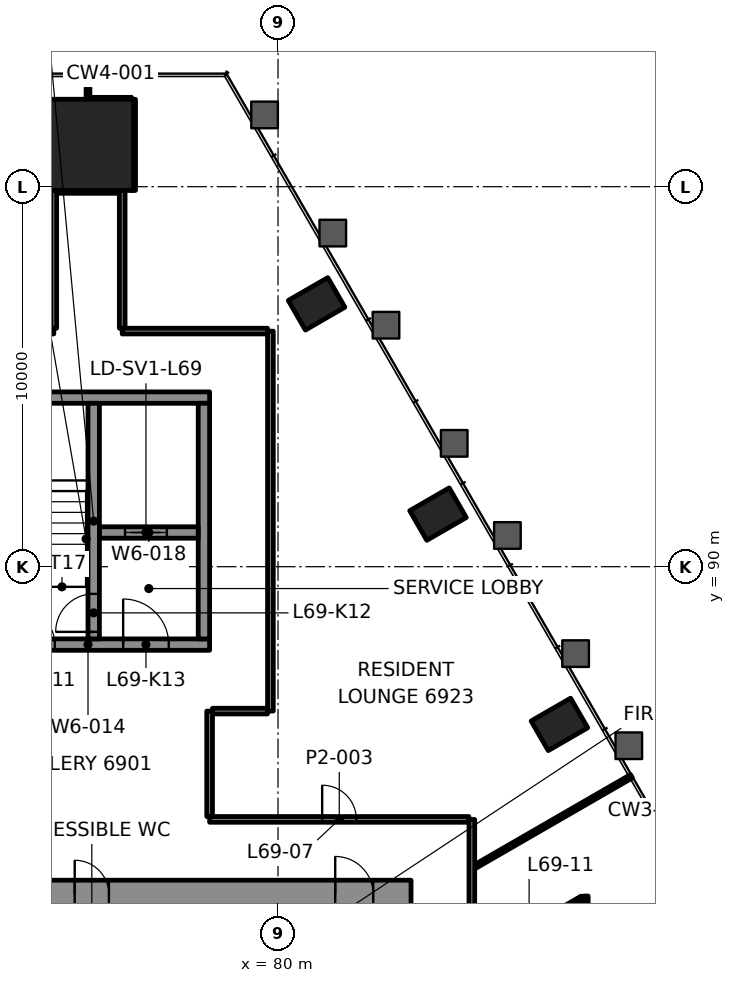
"""IFC4 building model, lengths in metres.
Left out: names, types, materials, properties, quantities, classifications, styles, units other than length and angle.
Written with IfcOpenShell. Run it as: python <this file> out.ifc"""

import sys

from ifc_helpers import new_model, si_unit, direction, frame, frame_2d, origin, origin_2d, place, context, subcontext, project, spatial, rectangle, hollow_rectangle, extrude, element, fill, save


model = new_model("IFC4")
c1 = context("Model", 3, precision=1e-05, world=origin(), true_north=direction((0.0, 1.0)))
c2 = subcontext(c1, "Body", "Model", "MODEL_VIEW")
j1 = project(units=[si_unit("LENGTHUNIT", "METRE"), si_unit("PLANEANGLEUNIT", "RADIAN")], contexts=[c1])
p1 = place(None, origin())
s1 = spatial("IfcSite", under=j1, at=p1, CompositionType="ELEMENT")
p2 = place(p1, origin())
s2 = spatial("IfcBuilding", under=s1, at=p2, CompositionType="ELEMENT")
p3 = place(p2, frame((0.0, 0.0, 288.1)))
s3 = spatial("IfcBuildingStorey", under=s2, at=p3, CompositionType="ELEMENT", Elevation=288.1)
p4 = place(p3, frame((75.0, 101.101, 0.0), z_axis=(0.0, 0.0, 1.0), x_axis=(-1.0, 0.0, 0.0)))
e1 = element("IfcColumn", 1, at=p4, inside=s3, PredefinedType="COLUMN", context=c2, shape_type="SweptSolid", body=[
    extrude(rectangle(XDim=2.4, YDim=2.4, at=origin_2d()), origin(), (0.0, 0.0, 1.0), 3.5),
])
for number, where, z_axis, x_axis in (
    (2, (87.405, 85.851, -0.0), (0.0, 0.0, 1.0), (-0.5, 0.866, 0.0)),
    (3, (84.21, 91.384, -0.0), (0.0, 0.0, 1.0), (-0.5, 0.866, 0.0)),
    (4, (81.015, 96.917, -0.0), (0.0, 0.0, 1.0), (-0.5, 0.866, 0.0)),
):
    element("IfcColumn", number, at=place(p3, frame(where, z_axis=z_axis, x_axis=x_axis)), inside=s3, PredefinedType="COLUMN", context=c2, shape_type="SweptSolid", body=[
        extrude(hollow_rectangle(XDim=0.9, YDim=1.2, WallThickness=0.06, at=origin_2d()), origin(), (0.0, 0.0, 1.0), 3.5),
    ])
p5 = place(p3, frame((66.5, 81.375, 0.0), z_axis=(0.0, 0.0, 1.0), x_axis=(1.0, 0.0, 0.0)))
e5 = element("IfcWall", 5, at=p5, inside=s3, PredefinedType="SHEAR", context=c2, shape_type="SweptSolid", body=[
    extrude(rectangle(XDim=17.0, YDim=0.75, at=frame_2d((8.5, 0.0))), origin(), (0.0, 0.0, 1.0), 3.3),
])
p6 = place(p5, frame((1.195, 0.0, 0.0)))
e6 = element("IfcOpeningElement", 6, at=p6, cuts=e5, PredefinedType="OPENING", context=c2, shape_type="SweptSolid", body=[
    extrude(rectangle(XDim=1.0, YDim=2.1, at=frame_2d((0.5, 1.05))), frame((0.0, 0.385, 0.0), z_axis=(0.0, -1.0, 0.0), x_axis=(1.0, 0.0, 0.0)), (0.0, 0.0, 1.0), 0.77),
])
p7 = place(p5, frame((15.005, 0.0, 0.0)))
e7 = element("IfcOpeningElement", 7, at=p7, cuts=e5, PredefinedType="OPENING", context=c2, shape_type="SweptSolid", body=[
    extrude(rectangle(XDim=1.0, YDim=2.1, at=frame_2d((0.5, 1.05))), frame((0.0, 0.385, 0.0), z_axis=(0.0, -1.0, 0.0), x_axis=(1.0, 0.0, 0.0)), (0.0, 0.0, 1.0), 0.77),
])
p8 = place(p5, frame((8.15, 0.0, 0.0)))
e8 = element("IfcOpeningElement", 8, at=p8, cuts=e5, PredefinedType="OPENING", context=c2, shape_type="SweptSolid", body=[
    extrude(rectangle(XDim=0.9, YDim=2.1, at=frame_2d((0.45, 1.05))), frame((0.0, 0.385, 0.0), z_axis=(0.0, -1.0, 0.0), x_axis=(1.0, 0.0, 0.0)), (0.0, 0.0, 1.0), 0.77),
])
p9 = place(p3, frame((71.8, 87.95, 0.0), z_axis=(0.0, 0.0, 1.0), x_axis=(1.0, 0.0, 0.0)))
e9 = element("IfcWall", 9, at=p9, inside=s3, PredefinedType="SHEAR", context=c2, shape_type="SweptSolid", body=[
    extrude(rectangle(XDim=6.4, YDim=0.3, at=frame_2d((3.2, 0.0))), origin(), (0.0, 0.0, 1.0), 3.3),
])
p10 = place(p9, frame((1.325, 0.0, 0.0)))
e10 = element("IfcOpeningElement", 10, at=p10, cuts=e9, PredefinedType="OPENING", context=c2, shape_type="SweptSolid", body=[
    extrude(rectangle(XDim=1.0, YDim=2.1, at=frame_2d((0.5, 1.05))), frame((0.0, 0.16, 0.0), z_axis=(0.0, -1.0, 0.0), x_axis=(1.0, 0.0, 0.0)), (0.0, 0.0, 1.0), 0.32),
])
p11 = place(p9, frame((4.125, 0.0, 0.0)))
e11 = element("IfcOpeningElement", 11, at=p11, cuts=e9, PredefinedType="OPENING", context=c2, shape_type="SweptSolid", body=[
    extrude(rectangle(XDim=1.2, YDim=2.1, at=frame_2d((0.6, 1.05))), frame((0.0, 0.16, 0.0), z_axis=(0.0, -1.0, 0.0), x_axis=(1.0, 0.0, 0.0)), (0.0, 0.0, 1.0), 0.32),
])
p12 = place(p3, frame((71.8, 94.45, 0.0), z_axis=(0.0, 0.0, 1.0), x_axis=(1.0, 0.0, 0.0)))
e12 = element("IfcWall", 12, at=p12, inside=s3, PredefinedType="SHEAR", context=c2, shape_type="SweptSolid", body=[
    extrude(rectangle(XDim=6.4, YDim=0.3, at=frame_2d((3.2, 0.0))), origin(), (0.0, 0.0, 1.0), 3.3),
])
p13 = place(p3, frame((78.05, 88.1, 0.0), z_axis=(0.0, 0.0, 1.0), x_axis=(0.0, 1.0, 0.0)))
e13 = element("IfcWall", 13, at=p13, inside=s3, PredefinedType="SHEAR", context=c2, shape_type="SweptSolid", body=[
    extrude(rectangle(XDim=6.2, YDim=0.3, at=frame_2d((3.1, 0.0))), origin(), (0.0, 0.0, 1.0), 3.3),
])
p14 = place(p3, frame((75.3, 90.9, 0.0), z_axis=(0.0, 0.0, 1.0), x_axis=(1.0, 0.0, 0.0)))
e14 = element("IfcWall", 14, at=p14, inside=s3, PredefinedType="SHEAR", context=c2, shape_type="SweptSolid", body=[
    extrude(rectangle(XDim=2.6, YDim=0.3, at=frame_2d((1.3, 0.0))), origin(), (0.0, 0.0, 1.0), 3.3),
])
p15 = place(p14, frame((0.675, 0.0, 0.0)))
e15 = element("IfcOpeningElement", 15, at=p15, cuts=e14, PredefinedType="OPENING", context=c2, shape_type="SweptSolid", body=[
    extrude(rectangle(XDim=1.1, YDim=2.1, at=frame_2d((0.55, 1.05))), frame((0.0, 0.16, 0.0), z_axis=(0.0, -1.0, 0.0), x_axis=(1.0, 0.0, 0.0)), (0.0, 0.0, 1.0), 0.32),
])
p16 = place(p3, frame((75.15, 88.1, 0.0), z_axis=(0.0, 0.0, 1.0), x_axis=(0.0, 1.0, 0.0)))
e16 = element("IfcWall", 16, at=p16, inside=s3, PredefinedType="SHEAR", context=c2, shape_type="SweptSolid", body=[
    extrude(rectangle(XDim=6.2, YDim=0.3, at=frame_2d((3.1, 0.0))), origin(), (0.0, 0.0, 1.0), 3.3),
])
p17 = place(p16, frame((0.185, 0.0, 0.0)))
e17 = element("IfcOpeningElement", 17, at=p17, cuts=e16, PredefinedType="OPENING", context=c2, shape_type="SweptSolid", body=[
    extrude(rectangle(XDim=1.0, YDim=2.1, at=frame_2d((0.5, 1.05))), frame((0.0, 0.16, 0.0), z_axis=(0.0, -1.0, 0.0), x_axis=(1.0, 0.0, 0.0)), (0.0, 0.0, 1.0), 0.32),
])
p18 = place(p3, frame((78.2, 83.35, 0.0), z_axis=(0.0, 0.0, 1.0), x_axis=(1.0, 0.0, 0.0)))
e18 = element("IfcWall", 18, at=p18, inside=s3, PredefinedType="PARTITIONING", context=c2, shape_type="SweptSolid", body=[
    extrude(rectangle(XDim=6.823, YDim=0.15, at=frame_2d((3.412, 0.0))), origin(), (0.0, 0.0, 1.0), 2.7),
])
p19 = place(p18, frame((2.961, 0.0, 0.0)))
e19 = element("IfcOpeningElement", 19, at=p19, cuts=e18, PredefinedType="OPENING", context=c2, shape_type="SweptSolid", body=[
    extrude(rectangle(XDim=0.9, YDim=2.1, at=frame_2d((0.45, 1.05))), frame((0.0, 0.085, 0.0), z_axis=(0.0, -1.0, 0.0), x_axis=(1.0, 0.0, 0.0)), (0.0, 0.0, 1.0), 0.17),
])
p20 = place(p3, frame((78.275, 86.2, 0.0), z_axis=(0.0, 0.0, 1.0), x_axis=(1.0, 0.0, 0.0)))
e20 = element("IfcWall", 20, at=p20, inside=s3, PredefinedType="PARTITIONING", context=c2, shape_type="SweptSolid", body=[
    extrude(rectangle(XDim=1.448, YDim=0.15, at=frame_2d((0.724, 0.0))), origin(), (0.0, 0.0, 1.0), 2.7),
])
p21 = place(p3, frame((70.302, 96.2, 0.0), z_axis=(0.0, 0.0, 1.0), x_axis=(1.0, 0.0, 0.0)))
e21 = element("IfcWall", 21, at=p21, inside=s3, PredefinedType="PARTITIONING", context=c2, shape_type="SweptSolid", body=[
    extrude(rectangle(XDim=3.798, YDim=0.15, at=frame_2d((1.899, 0.0))), origin(), (0.0, 0.0, 1.0), 2.7),
])
p22 = place(p21, frame((1.449, 0.0, 0.0)))
e22 = element("IfcOpeningElement", 22, at=p22, cuts=e21, PredefinedType="OPENING", context=c2, shape_type="SweptSolid", body=[
    extrude(rectangle(XDim=0.9, YDim=2.1, at=frame_2d((0.45, 1.05))), frame((0.0, 0.085, 0.0), z_axis=(0.0, -1.0, 0.0), x_axis=(1.0, 0.0, 0.0)), (0.0, 0.0, 1.0), 0.17),
])
p23 = place(p3, frame((75.9, 96.2, 0.0), z_axis=(0.0, 0.0, 1.0), x_axis=(1.0, 0.0, 0.0)))
e23 = element("IfcWall", 23, at=p23, inside=s3, PredefinedType="PARTITIONING", context=c2, shape_type="SweptSolid", body=[
    extrude(rectangle(XDim=3.823, YDim=0.15, at=frame_2d((1.911, 0.0))), origin(), (0.0, 0.0, 1.0), 2.7),
])
p24 = place(p3, frame((74.176, 99.901, 0.0), z_axis=(0.0, 0.0, 1.0), x_axis=(1.0, 0.0, 0.0)))
e24 = element("IfcWall", 24, at=p24, inside=s3, PredefinedType="PARTITIONING", context=c2, shape_type="SweptSolid", body=[
    extrude(rectangle(XDim=1.642, YDim=0.15, at=frame_2d((0.821, 0.0))), origin(), (0.0, 0.0, 1.0), 2.697),
])
p25 = place(p3, frame((75.0, 102.301, 0.0), z_axis=(0.0, 0.0, 1.0), x_axis=(1.0, 0.0, 0.0)))
e25 = element("IfcWall", 25, at=p25, inside=s3, PredefinedType="PARTITIONING", context=c2, shape_type="SweptSolid", body=[
    extrude(rectangle(XDim=1.147, YDim=0.1, at=frame_2d((0.574, 0.0))), origin(), (0.0, 0.0, 1.0), 2.7),
])
p26 = place(p3, frame((88.005, 81.279, 0.0), z_axis=(0.0, 0.0, 1.0), x_axis=(-0.866000447062, -0.500043223821, 0.0)))
e26 = element("IfcWall", 26, at=p26, inside=s3, PredefinedType="PARTITIONING", context=c2, shape_type="SweptSolid", body=[
    extrude(rectangle(XDim=3.228, YDim=0.12, at=frame_2d((1.614, 0.0))), origin(), (0.0, 0.0, 1.0), 2.7),
])
p27 = place(p26, frame((1.214, 0.0, 0.0)))
e27 = element("IfcOpeningElement", 27, at=p27, cuts=e26, PredefinedType="OPENING", context=c2, shape_type="SweptSolid", body=[
    extrude(rectangle(XDim=0.8, YDim=2.1, at=frame_2d((0.4, 1.05))), frame((0.0, 0.07, 0.0), z_axis=(0.0, -1.0, 0.0), x_axis=(1.0, 0.0, 0.0)), (0.0, 0.0, 1.0), 0.14),
])
p28 = place(p3, frame((85.201, 82.119, 0.0), z_axis=(0.0, 0.0, 1.0), x_axis=(0.866035297817, 0.499982862641, 0.0)))
e28 = element("IfcWall", 28, at=p28, inside=s3, PredefinedType="PARTITIONING", context=c2, shape_type="SweptSolid", body=[
    extrude(rectangle(XDim=4.734, YDim=0.1, at=frame_2d((2.367, 0.0))), origin(), (0.0, 0.0, 1.0), 2.688),
])
p29 = place(p3, frame((88.1, 81.334, 0.0), z_axis=(0.0, 0.0, 1.0), x_axis=(0.0, -1.0, 0.0)))
e29 = element("IfcWall", 29, at=p29, inside=s3, PredefinedType="PARTITIONING", context=c2, shape_type="SweptSolid", body=[
    extrude(rectangle(XDim=7.378, YDim=0.12, at=frame_2d((3.689, 0.0))), origin(), (0.0, 0.0, 1.0), 2.7),
])
p30 = place(p29, frame((4.982, 0.0, 0.0)))
e30 = element("IfcOpeningElement", 30, at=p30, cuts=e29, PredefinedType="OPENING", context=c2, shape_type="SweptSolid", body=[
    extrude(rectangle(XDim=0.9, YDim=2.1, at=frame_2d((0.45, 1.05))), frame((0.0, 0.07, 0.0), z_axis=(0.0, -1.0, 0.0), x_axis=(1.0, 0.0, 0.0)), (0.0, 0.0, 1.0), 0.14),
])
p31 = place(p3, frame((85.1, 83.348, 0.0), z_axis=(0.0, 0.0, 1.0), x_axis=(0.0, -1.0, 0.0)))
e31 = element("IfcWall", 31, at=p31, inside=s3, PredefinedType="PARTITIONING", context=c2, shape_type="SweptSolid", body=[
    extrude(rectangle(XDim=13.053, YDim=0.15, at=frame_2d((6.527, 0.0))), origin(), (0.0, 0.0, 1.0), 2.7),
])
p32 = place(p31, frame((8.78, 0.0, 0.0)))
e32 = element("IfcOpeningElement", 32, at=p32, cuts=e31, PredefinedType="OPENING", context=c2, shape_type="SweptSolid", body=[
    extrude(rectangle(XDim=1.0, YDim=2.1, at=frame_2d((0.5, 1.05))), frame((0.0, 0.085, 0.0), z_axis=(0.0, -1.0, 0.0), x_axis=(1.0, 0.0, 0.0)), (0.0, 0.0, 1.0), 0.17),
])
p33 = place(p31, frame((11.537, 0.0, 0.0)))
e33 = element("IfcOpeningElement", 33, at=p33, cuts=e31, PredefinedType="OPENING", context=c2, shape_type="SweptSolid", body=[
    extrude(rectangle(XDim=0.9, YDim=2.1, at=frame_2d((0.45, 1.05))), frame((0.0, 0.085, 0.0), z_axis=(0.0, -1.0, 0.0), x_axis=(1.0, 0.0, 0.0)), (0.0, 0.0, 1.0), 0.17),
])
p34 = place(p3, frame((79.8, 86.202, 0.0), z_axis=(0.0, 0.0, 1.0), x_axis=(0.0, 1.0, 0.0)))
e34 = element("IfcWall", 34, at=p34, inside=s3, PredefinedType="PARTITIONING", context=c2, shape_type="SweptSolid", body=[
    extrude(rectangle(XDim=9.996, YDim=0.15, at=frame_2d((4.998, 0.0))), origin(), (0.0, 0.0, 1.0), 2.7),
])
p35 = place(p3, frame((78.2, 83.425, 0.0), z_axis=(0.0, 0.0, 1.0), x_axis=(0.0, 1.0, 0.0)))
e35 = element("IfcWall", 35, at=p35, inside=s3, PredefinedType="PARTITIONING", context=c2, shape_type="SweptSolid", body=[
    extrude(rectangle(XDim=2.775, YDim=0.15, at=frame_2d((1.387, 0.0))), origin(), (0.0, 0.0, 1.0), 2.697),
])
p36 = place(p3, frame((76.2, 99.903, 0.0), z_axis=(0.0, 0.0, 1.0), x_axis=(0.0, 1.0, 0.0)))
e36 = element("IfcWall", 36, at=p36, inside=s3, PredefinedType="PARTITIONING", context=c2, shape_type="SweptSolid", body=[
    extrude(rectangle(XDim=2.396, YDim=0.1, at=frame_2d((1.198, 0.0))), origin(), (0.0, 0.0, 1.0), 2.7),
])
p37 = place(p3, frame((75.9, 96.275, 0.0), z_axis=(0.0, 0.0, 1.0), x_axis=(0.0, 1.0, 0.0)))
e37 = element("IfcWall", 37, at=p37, inside=s3, PredefinedType="PARTITIONING", context=c2, shape_type="SweptSolid", body=[
    extrude(rectangle(XDim=3.625, YDim=0.15, at=frame_2d((1.813, 0.0))), origin(), (0.0, 0.0, 1.0), 2.7),
])
p38 = place(p3, frame((75.0, 102.351, 0.0), z_axis=(0.0, 0.0, 1.0), x_axis=(0.0, 1.0, 0.0)))
e38 = element("IfcWall", 38, at=p38, inside=s3, PredefinedType="PARTITIONING", context=c2, shape_type="SweptSolid", body=[
    extrude(rectangle(XDim=0.25, YDim=0.1, at=frame_2d((0.125, 0.0))), origin(), (0.0, 0.0, 1.0), 2.7),
])
p39 = place(p3, frame((74.1, 96.275, 0.0), z_axis=(0.0, 0.0, 1.0), x_axis=(0.0, 1.0, 0.0)))
e39 = element("IfcWall", 39, at=p39, inside=s3, PredefinedType="PARTITIONING", context=c2, shape_type="SweptSolid", body=[
    extrude(rectangle(XDim=3.625, YDim=0.15, at=frame_2d((1.812, 0.0))), origin(), (0.0, 0.0, 1.0), 2.7),
])
p40 = place(p19, origin())
e40 = element("IfcDoor", 40, at=p40, inside=s3, OperationType="SINGLE_SWING_RIGHT", PredefinedType="DOOR", context=c2, shape_type="SweptSolid", body=[
    extrude(rectangle(XDim=0.9, YDim=2.1, at=frame_2d((0.45, 1.05))), frame((0.0, 0.025, 0.0), z_axis=(0.0, -1.0, 0.0), x_axis=(1.0, 0.0, 0.0)), (0.0, 0.0, 1.0), 0.05),
])
fill(e19, e40)
p41 = place(p15, origin())
e41 = element("IfcDoor", 41, at=p41, inside=s3, OperationType="DOUBLE_DOOR_SLIDING", PredefinedType="DOOR", context=c2, shape_type="SweptSolid", body=[
    extrude(rectangle(XDim=1.1, YDim=2.1, at=frame_2d((0.55, 1.05))), frame((0.0, 0.025, 0.0), z_axis=(0.0, -1.0, 0.0), x_axis=(1.0, 0.0, 0.0)), (0.0, 0.0, 1.0), 0.05),
])
fill(e15, e41)
p42 = place(p7, origin())
e42 = element("IfcDoor", 42, at=p42, inside=s3, OperationType="SINGLE_SWING_LEFT", PredefinedType="DOOR", context=c2, shape_type="SweptSolid", body=[
    extrude(rectangle(XDim=1.0, YDim=2.1, at=frame_2d((0.5, 1.05))), frame((0.0, 0.095, 0.0), z_axis=(0.0, -1.0, 0.0), x_axis=(1.0, 0.0, 0.0)), (0.0, 0.0, 1.0), 0.19),
])
fill(e7, e42)
p43 = place(p10, origin())
e43 = element("IfcDoor", 43, at=p43, inside=s3, OperationType="SINGLE_SWING_RIGHT", PredefinedType="DOOR", context=c2, shape_type="SweptSolid", body=[
    extrude(rectangle(XDim=1.0, YDim=2.1, at=frame_2d((0.5, 1.05))), frame((0.0, 0.025, 0.0), z_axis=(0.0, -1.0, 0.0), x_axis=(1.0, 0.0, 0.0)), (0.0, 0.0, 1.0), 0.05),
])
fill(e10, e43)
p44 = place(p17, origin())
e44 = element("IfcDoor", 44, at=p44, inside=s3, OperationType="SINGLE_SWING_LEFT", PredefinedType="DOOR", context=c2, shape_type="SweptSolid", body=[
    extrude(rectangle(XDim=1.0, YDim=2.1, at=frame_2d((0.5, 1.05))), frame((0.0, 0.025, 0.0), z_axis=(0.0, -1.0, 0.0), x_axis=(1.0, 0.0, 0.0)), (0.0, 0.0, 1.0), 0.05),
])
fill(e17, e44)
p45 = place(p11, origin())
e45 = element("IfcDoor", 45, at=p45, inside=s3, OperationType="SINGLE_SWING_RIGHT", PredefinedType="DOOR", context=c2, shape_type="SweptSolid", body=[
    extrude(rectangle(XDim=1.2, YDim=2.1, at=frame_2d((0.6, 1.05))), frame((0.0, 0.025, 0.0), z_axis=(0.0, -1.0, 0.0), x_axis=(1.0, 0.0, 0.0)), (0.0, 0.0, 1.0), 0.05),
])
fill(e11, e45)
p46 = place(p8, origin())
e46 = element("IfcDoor", 46, at=p46, inside=s3, OperationType="SINGLE_SWING_RIGHT", PredefinedType="DOOR", context=c2, shape_type="SweptSolid", body=[
    extrude(rectangle(XDim=0.9, YDim=2.1, at=frame_2d((0.45, 1.05))), frame((0.0, 0.095, 0.0), z_axis=(0.0, -1.0, 0.0), x_axis=(1.0, 0.0, 0.0)), (0.0, 0.0, 1.0), 0.19),
])
fill(e8, e46)
save(model, sys.argv[1])
